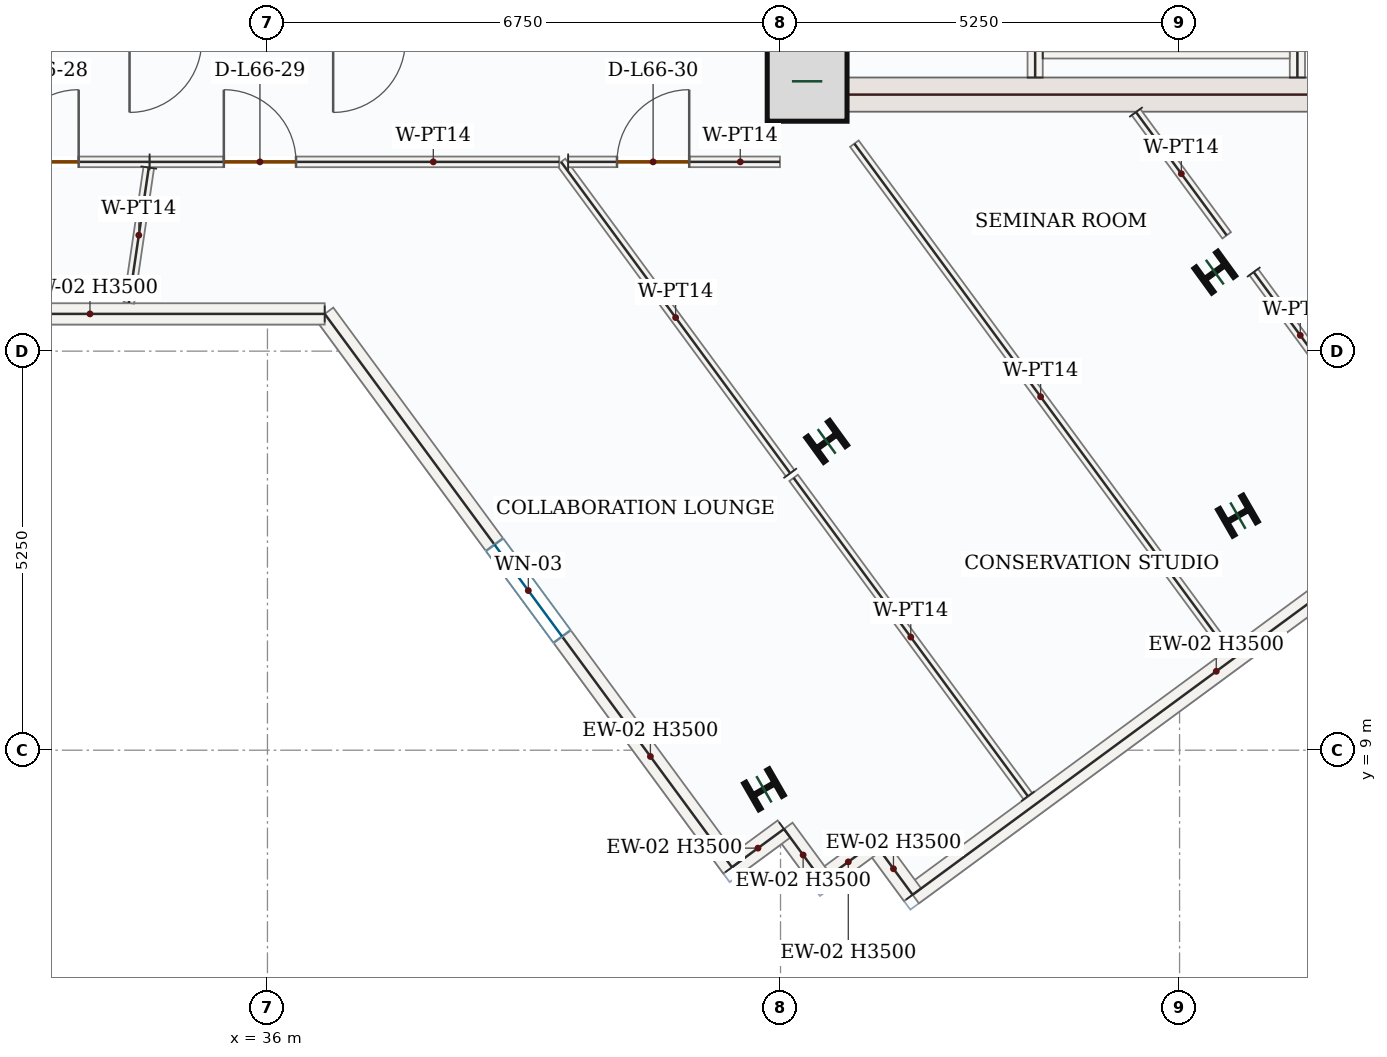
"""IFC4 building model, lengths in metres.
Left out: names, types, materials, properties, quantities, classifications, styles, units other than length and angle.
Written with IfcOpenShell. Run it as: python <this file> out.ifc"""

import sys

from ifc_helpers import new_model, si_unit, direction, frame, frame_2d, origin, origin_2d, place, context, subcontext, project, spatial, rectangle, i_section, extrude, source, transform, mapped, element, fill, save


model = new_model("IFC4")
c1 = context("Model", 3, precision=1e-05, world=origin(), true_north=direction((0.0, 1.0)))
c2 = subcontext(c1, "Body", "Model", "MODEL_VIEW")
j1 = project(units=[si_unit("LENGTHUNIT", "METRE"), si_unit("PLANEANGLEUNIT", "RADIAN")], contexts=[c1])
p1 = place(None, origin())
s1 = spatial("IfcSite", under=j1, at=p1, CompositionType="ELEMENT")
p2 = place(p1, origin())
s2 = spatial("IfcBuilding", under=s1, at=p2, CompositionType="ELEMENT")
p3 = place(p2, frame((0.0, 0.0, 276.6)))
s3 = spatial("IfcBuildingStorey", under=s2, at=p3, CompositionType="ELEMENT", Elevation=276.6)
p4 = place(p3, frame((42.975, 17.4, 0.0), z_axis=(0.0, 0.0, 1.0), x_axis=(0.0, 1.0, 0.0)))
e1 = element("IfcWall", 1, at=p4, inside=s3, PredefinedType="SHEAR", context=c2, shape_type="SweptSolid", body=[
    extrude(rectangle(XDim=8.55, YDim=0.45, at=frame_2d((4.275, 0.0))), origin(), (0.0, 0.0, 1.0), 3.5),
])
p5 = place(p4, frame((6.65, 0.0, 0.0)))
e2 = element("IfcOpeningElement", 2, at=p5, cuts=e1, PredefinedType="OPENING", context=c2, shape_type="SweptSolid", body=[
    extrude(rectangle(XDim=1.1, YDim=2.2, at=frame_2d((0.55, 1.1))), frame((0.0, 0.235, 0.0), z_axis=(0.0, -1.0, 0.0), x_axis=(1.0, 0.0, 0.0)), (0.0, 0.0, 1.0), 0.47),
])
p6 = place(p4, frame((1.75, 0.0, 0.0)))
e3 = element("IfcOpeningElement", 3, at=p6, cuts=e1, PredefinedType="OPENING", context=c2, shape_type="SweptSolid", body=[
    extrude(rectangle(XDim=1.3, YDim=2.2, at=frame_2d((0.65, 1.1))), frame((0.0, 0.235, 0.0), z_axis=(0.0, -1.0, 0.0), x_axis=(1.0, 0.0, 0.0)), (0.0, 0.0, 1.0), 0.47),
])
p7 = place(p4, frame((4.3, 0.0, 0.0)))
e4 = element("IfcOpeningElement", 4, at=p7, cuts=e1, PredefinedType="OPENING", context=c2, shape_type="SweptSolid", body=[
    extrude(rectangle(XDim=0.88, YDim=2.1, at=frame_2d((0.44, 1.05))), frame((0.0, 0.235, 0.0), z_axis=(0.0, -1.0, 0.0), x_axis=(1.0, 0.0, 0.0)), (0.0, 0.0, 1.0), 0.47),
])
m1 = source(origin(), c2, "Body", "SweptSolid", [
    extrude(rectangle(XDim=7.1, YDim=0.45, at=frame_2d((3.55, 0.0))), origin(), (0.0, 0.0, 1.0), 3.5),
])
p8 = place(p3, frame((43.2, 17.625, 0.0), z_axis=(0.0, 0.0, 1.0), x_axis=(1.0, 0.0, 0.0)))
e5 = element("IfcWall", 5, at=p8, inside=s3, PredefinedType="SHEAR", context=c2, shape_type="MappedRepresentation", body=[
    mapped(m1, transform((0.0, 0.0, 0.0), x_axis=(1.0, 0.0, 0.0), y_axis=(0.0, 1.0, 0.0), z_axis=(0.0, 0.0, 1.0), scale=1.0)),
])
m2 = source(origin(), c2, "Body", "SweptSolid", [
    extrude(rectangle(XDim=1.05, YDim=1.05, at=origin_2d()), origin(), (0.0, 0.0, 1.0), 3.75),
])
p9 = place(p3, frame((43.1, 17.8, 0.0), z_axis=(0.0, 0.0, 1.0), x_axis=(1.0, 0.0, 0.0)))
e6 = element("IfcColumn", 6, at=p9, inside=s3, PredefinedType="COLUMN", context=c2, shape_type="MappedRepresentation", body=[
    mapped(m2, transform((0.0, 0.0, 0.0), x_axis=(1.0, 0.0, 0.0), y_axis=(0.0, 1.0, 0.0), z_axis=(0.0, 0.0, 1.0), scale=1.0)),
])
m3 = source(origin(), c2, "Body", "SweptSolid", [
    extrude(i_section(OverallWidth=0.399, OverallDepth=0.386, WebThickness=0.021, FlangeThickness=0.033, FilletRadius=0.018, at=origin_2d()), origin(), (0.0, 0.0, 1.0), 3.75),
])
for number, where, z_axis, x_axis in (
    (7, (43.357, 13.063, 0.0), (0.0, 0.0, 1.0), (-0.588, 0.809, 0.0)),
    (8, (48.464, 15.289, 0.0), (0.0, 0.0, 1.0), (-0.588, 0.809, 0.0)),
    (9, (42.532, 8.486, 0.0), (0.0, 0.0, 1.0), (-0.5, 0.866, 0.0)),
    (10, (48.768, 12.086, 0.0), (0.0, 0.0, 1.0), (-0.5, 0.866, 0.0)),
):
    element("IfcColumn", number, at=place(p3, frame(where, z_axis=z_axis, x_axis=x_axis)), inside=s3, PredefinedType="COLUMN", context=c2, shape_type="MappedRepresentation", body=[
        mapped(m3, transform((0.0, 0.0, 0.0), x_axis=(1.0, 0.0, 0.0), y_axis=(0.0, 1.0, 0.0), z_axis=(0.0, 0.0, 1.0), scale=1.0)),
    ])
m4 = source(origin(), c2, "Body", "SweptSolid", [
    extrude(rectangle(XDim=9.92, YDim=0.28, at=frame_2d((4.96, 0.0))), origin(), (0.0, 0.0, 1.0), 3.5),
])
p10 = place(p3, frame((52.478, 12.978, 0.0), z_axis=(0.0, 0.0, 1.0), x_axis=(-0.805418797839, -0.592706132994, 0.0)))
e11 = element("IfcWall", 11, at=p10, inside=s3, PredefinedType="SOLIDWALL", context=c2, shape_type="MappedRepresentation", body=[
    mapped(m4, transform((0.0, 0.0, 0.0), x_axis=(1.0, 0.0, 0.0), y_axis=(0.0, 1.0, 0.0), z_axis=(0.0, 0.0, 1.0), scale=1.0)),
])
m5 = source(origin(), c2, "Body", "SweptSolid", [
    extrude(rectangle(XDim=0.85, YDim=0.28, at=frame_2d((0.425, 0.0))), origin(), (0.0, 0.0, 1.0), 3.5),
])
for number, where, z_axis, x_axis in (
    (12, (44.488, 7.098, 0.0), (0.0, 0.0, 1.0), (-0.593, 0.805, 0.0)),
    (13, (43.984, 7.783, 0.0), (0.0, 0.0, 1.0), (-0.805, -0.593, 0.0)),
):
    element("IfcWall", number, at=place(p3, frame(where, z_axis=z_axis, x_axis=x_axis)), inside=s3, PredefinedType="SOLIDWALL", context=c2, shape_type="MappedRepresentation", body=[
        mapped(m5, transform((0.0, 0.0, 0.0), x_axis=(1.0, 0.0, 0.0), y_axis=(0.0, 1.0, 0.0), z_axis=(0.0, 0.0, 1.0), scale=1.0)),
    ])
m6 = source(origin(), c2, "Body", "SweptSolid", [
    extrude(rectangle(XDim=0.85, YDim=0.28, at=frame_2d((0.425, 0.0))), origin(), (0.0, 0.0, 1.0), 3.5),
])
for number, where, z_axis, x_axis in (
    (14, (43.299, 7.279, 0.0), (0.0, 0.0, 1.0), (-0.593, 0.805, 0.0)),
    (15, (42.796, 7.963, 0.0), (0.0, 0.0, 1.0), (-0.805, -0.593, 0.0)),
):
    element("IfcWall", number, at=place(p3, frame(where, z_axis=z_axis, x_axis=x_axis)), inside=s3, PredefinedType="SOLIDWALL", context=c2, shape_type="MappedRepresentation", body=[
        mapped(m6, transform((0.0, 0.0, 0.0), x_axis=(1.0, 0.0, 0.0), y_axis=(0.0, 1.0, 0.0), z_axis=(0.0, 0.0, 1.0), scale=1.0)),
    ])
p11 = place(p3, frame((42.111, 7.46, 0.0), z_axis=(0.0, 0.0, 1.0), x_axis=(-0.592715239748, 0.805412096117, 0.0)))
e16 = element("IfcWall", 16, at=p11, inside=s3, PredefinedType="SOLIDWALL", context=c2, shape_type="SweptSolid", body=[
    extrude(rectangle(XDim=9.039, YDim=0.28, at=frame_2d((4.52, 0.0))), origin(), (0.0, 0.0, 1.0), 3.5),
])
p12 = place(p11, frame((3.77, 0.0, 0.85)))
e17 = element("IfcOpeningElement", 17, at=p12, cuts=e16, PredefinedType="OPENING", context=c2, shape_type="SweptSolid", body=[
    extrude(rectangle(XDim=1.5, YDim=1.5, at=frame_2d((0.75, 0.75))), frame((0.0, 0.15, 0.0), z_axis=(0.0, -1.0, 0.0), x_axis=(1.0, 0.0, 0.0)), (0.0, 0.0, 1.0), 0.3),
])
m7 = source(origin(), c2, "Body", "SweptSolid", [
    extrude(rectangle(XDim=6.177, YDim=0.28, at=frame_2d((3.088, 0.0))), origin(), (0.0, 0.0, 1.0), 3.5),
])
p13 = place(p3, frame((36.753, 14.74, 0.0), z_axis=(0.0, 0.0, 1.0), x_axis=(-1.0, 0.0, 0.0)))
e18 = element("IfcWall", 18, at=p13, inside=s3, PredefinedType="SOLIDWALL", context=c2, shape_type="MappedRepresentation", body=[
    mapped(m7, transform((0.0, 0.0, 0.0), x_axis=(1.0, 0.0, 0.0), y_axis=(0.0, 1.0, 0.0), z_axis=(0.0, 0.0, 1.0), scale=1.0)),
])
m8 = source(origin(), c2, "Body", "SweptSolid", [
    extrude(rectangle(XDim=7.87, YDim=0.2, at=frame_2d((3.935, 0.0))), origin(), (0.0, 0.0, 1.0), 3.5),
])
p14 = place(p3, frame((49.55, 17.85, 0.0), z_axis=(0.0, 0.0, 1.0), x_axis=(0.0, 1.0, 0.0)))
e19 = element("IfcWall", 19, at=p14, inside=s3, PredefinedType="SOLIDWALL", context=c2, shape_type="MappedRepresentation", body=[
    mapped(m8, transform((0.0, 0.0, 0.0), x_axis=(1.0, 0.0, 0.0), y_axis=(0.0, 1.0, 0.0), z_axis=(0.0, 0.0, 1.0), scale=1.0)),
])
p15 = place(p3, frame((46.1, 17.85, 0.0), z_axis=(0.0, 0.0, 1.0), x_axis=(0.0, 1.0, 0.0)))
e20 = element("IfcWall", 20, at=p15, inside=s3, PredefinedType="SOLIDWALL", context=c2, shape_type="SweptSolid", body=[
    extrude(rectangle(XDim=8.0, YDim=0.2, at=frame_2d((4.0, 0.0))), origin(), (0.0, 0.0, 1.0), 3.5),
])
p16 = place(p15, frame((6.3, 0.0, 0.0)))
e21 = element("IfcOpeningElement", 21, at=p16, cuts=e20, PredefinedType="OPENING", context=c2, shape_type="SweptSolid", body=[
    extrude(rectangle(XDim=1.05, YDim=2.15, at=frame_2d((0.525, 1.075))), frame((0.0, 0.11, 0.0), z_axis=(0.0, -1.0, 0.0), x_axis=(1.0, 0.0, 0.0)), (0.0, 0.0, 1.0), 0.22),
])
m9 = source(origin(), c2, "Body", "SweptSolid", [
    extrude(rectangle(XDim=3.25, YDim=0.2, at=frame_2d((1.625, 0.0))), origin(), (0.0, 0.0, 1.0), 3.5),
])
p17 = place(p3, frame((46.2, 18.2, 0.0), z_axis=(0.0, 0.0, 1.0), x_axis=(1.0, 0.0, 0.0)))
e22 = element("IfcWall", 22, at=p17, inside=s3, PredefinedType="SOLIDWALL", context=c2, shape_type="MappedRepresentation", body=[
    mapped(m9, transform((0.0, 0.0, 0.0), x_axis=(1.0, 0.0, 0.0), y_axis=(0.0, 1.0, 0.0), z_axis=(0.0, 0.0, 1.0), scale=1.0)),
])
m10 = source(origin(), c2, "Body", "SweptSolid", [
    extrude(rectangle(XDim=8.268, YDim=0.14, at=frame_2d((4.134, 0.0))), origin(), (0.0, 0.0, 1.0), 3.5),
])
p18 = place(p3, frame((48.622, 10.321, 0.0), z_axis=(0.0, 0.0, 1.0), x_axis=(-0.592718477136, 0.805409713663, 0.0)))
e23 = element("IfcWall", 23, at=p18, inside=s3, PredefinedType="PARTITIONING", context=c2, shape_type="MappedRepresentation", body=[
    mapped(m10, transform((0.0, 0.0, 0.0), x_axis=(1.0, 0.0, 0.0), y_axis=(0.0, 1.0, 0.0), z_axis=(0.0, 0.0, 1.0), scale=1.0)),
])
m11 = source(origin(), c2, "Body", "SweptSolid", [
    extrude(rectangle(XDim=2.013, YDim=0.14, at=frame_2d((1.006, 0.0))), origin(), (0.0, 0.0, 1.0), 3.5),
])
p19 = place(p3, frame((47.427, 17.395, 0.0), z_axis=(0.0, 0.0, 1.0), x_axis=(0.592698341467, -0.80542453155, 0.0)))
e24 = element("IfcWall", 24, at=p19, inside=s3, PredefinedType="PARTITIONING", context=c2, shape_type="MappedRepresentation", body=[
    mapped(m11, transform((0.0, 0.0, 0.0), x_axis=(1.0, 0.0, 0.0), y_axis=(0.0, 1.0, 0.0), z_axis=(0.0, 0.0, 1.0), scale=1.0)),
])
p20 = place(p3, frame((48.975, 15.29, 0.0), z_axis=(0.0, 0.0, 1.0), x_axis=(0.592735674873, -0.805397057192, 0.0)))
e25 = element("IfcWall", 25, at=p20, inside=s3, PredefinedType="PARTITIONING", context=c2, shape_type="SweptSolid", body=[
    extrude(rectangle(XDim=3.793, YDim=0.14, at=frame_2d((1.896, 0.0))), origin(), (0.0, 0.0, 1.0), 3.5),
])
p21 = place(p20, frame((2.218, 0.0, 0.0)))
e26 = element("IfcOpeningElement", 26, at=p21, cuts=e25, PredefinedType="OPENING", context=c2, shape_type="SweptSolid", body=[
    extrude(rectangle(XDim=0.95, YDim=2.15, at=frame_2d((0.475, 1.075))), frame((0.0, 0.08, 0.0), z_axis=(0.0, -1.0, 0.0), x_axis=(1.0, 0.0, 0.0)), (0.0, 0.0, 1.0), 0.16),
])
m12 = source(origin(), c2, "Body", "SweptSolid", [
    extrude(rectangle(XDim=5.2, YDim=0.14, at=frame_2d((2.6, 0.0))), origin(), (0.0, 0.0, 1.0), 3.5),
])
p22 = place(p3, frame((46.005, 8.394, 0.0), z_axis=(0.0, 0.0, 1.0), x_axis=(-0.592704087561, 0.805420303065, 0.0)))
e27 = element("IfcWall", 27, at=p22, inside=s3, PredefinedType="PARTITIONING", context=c2, shape_type="MappedRepresentation", body=[
    mapped(m12, transform((0.0, 0.0, 0.0), x_axis=(1.0, 0.0, 0.0), y_axis=(0.0, 1.0, 0.0), z_axis=(0.0, 0.0, 1.0), scale=1.0)),
])
m13 = source(origin(), c2, "Body", "SweptSolid", [
    extrude(rectangle(XDim=5.086, YDim=0.14, at=frame_2d((2.543, 0.0))), origin(), (0.0, 0.0, 1.0), 3.5),
])
p23 = place(p3, frame((42.877, 12.644, 0.0), z_axis=(0.0, 0.0, 1.0), x_axis=(-0.592678177251, 0.805439369668, 0.0)))
e28 = element("IfcWall", 28, at=p23, inside=s3, PredefinedType="PARTITIONING", context=c2, shape_type="MappedRepresentation", body=[
    mapped(m13, transform((0.0, 0.0, 0.0), x_axis=(1.0, 0.0, 0.0), y_axis=(0.0, 1.0, 0.0), z_axis=(0.0, 0.0, 1.0), scale=1.0)),
])
p24 = place(p3, frame((39.956, 16.74, 0.0), z_axis=(0.0, 0.0, 1.0), x_axis=(0.999999996161, 8.7619381e-05, 0.0)))
e29 = element("IfcWall", 29, at=p24, inside=s3, PredefinedType="PARTITIONING", context=c2, shape_type="SweptSolid", body=[
    extrude(rectangle(XDim=2.786, YDim=0.14, at=frame_2d((1.393, 0.0))), origin(), (0.0, 0.0, 1.0), 3.5),
])
p25 = place(p24, frame((0.643, 0.0, 0.0)))
e30 = element("IfcOpeningElement", 30, at=p25, cuts=e29, PredefinedType="OPENING", context=c2, shape_type="SweptSolid", body=[
    extrude(rectangle(XDim=0.95, YDim=2.15, at=frame_2d((0.475, 1.075))), frame((0.0, 0.08, 0.0), z_axis=(0.0, -1.0, 0.0), x_axis=(1.0, 0.0, 0.0)), (0.0, 0.0, 1.0), 0.16),
])
p26 = place(p3, frame((29.258, 16.74, 0.0), z_axis=(0.0, 0.0, 1.0), x_axis=(0.999999998895, -4.7021207e-05, 0.0)))
e31 = element("IfcWall", 31, at=p26, inside=s3, PredefinedType="PARTITIONING", context=c2, shape_type="SweptSolid", body=[
    extrude(rectangle(XDim=5.192, YDim=0.14, at=frame_2d((2.596, 0.0))), origin(), (0.0, 0.0, 1.0), 3.5),
])
p27 = place(p26, frame((3.309, 0.0, 0.0)))
e32 = element("IfcOpeningElement", 32, at=p27, cuts=e31, PredefinedType="OPENING", context=c2, shape_type="SweptSolid", body=[
    extrude(rectangle(XDim=0.95, YDim=2.15, at=frame_2d((0.475, 1.075))), frame((0.0, 0.08, 0.0), z_axis=(0.0, -1.0, 0.0), x_axis=(1.0, 0.0, 0.0)), (0.0, 0.0, 1.0), 0.16),
])
m14 = source(origin(), c2, "Body", "SweptSolid", [
    extrude(rectangle(XDim=1.799, YDim=0.14, at=frame_2d((0.9, 0.0))), origin(), (0.0, 0.0, 1.0), 3.5),
])
p28 = place(p3, frame((34.439, 16.665, 0.0), z_axis=(0.0, 0.0, 1.0), x_axis=(-0.14573227875, -0.989324063657, 0.0)))
e33 = element("IfcWall", 33, at=p28, inside=s3, PredefinedType="PARTITIONING", context=c2, shape_type="MappedRepresentation", body=[
    mapped(m14, transform((0.0, 0.0, 0.0), x_axis=(1.0, 0.0, 0.0), y_axis=(0.0, 1.0, 0.0), z_axis=(0.0, 0.0, 1.0), scale=1.0)),
])
p29 = place(p3, frame((34.45, 16.74, 0.0), z_axis=(0.0, 0.0, 1.0), x_axis=(1.0, 0.0, 0.0)))
e34 = element("IfcWall", 34, at=p29, inside=s3, PredefinedType="PARTITIONING", context=c2, shape_type="SweptSolid", body=[
    extrude(rectangle(XDim=5.388, YDim=0.14, at=frame_2d((2.694, 0.0))), origin(), (0.0, 0.0, 1.0), 3.5),
])
p30 = place(p29, frame((0.976, 0.0, 0.0)))
e35 = element("IfcOpeningElement", 35, at=p30, cuts=e34, PredefinedType="OPENING", context=c2, shape_type="SweptSolid", body=[
    extrude(rectangle(XDim=0.95, YDim=2.15, at=frame_2d((0.475, 1.075))), frame((0.0, 0.08, 0.0), z_axis=(0.0, -1.0, 0.0), x_axis=(1.0, 0.0, 0.0)), (0.0, 0.0, 1.0), 0.16),
])
m15 = source(origin(), c2, "Body", "SweptSolid", [
    extrude(rectangle(XDim=1.5, YDim=1.5, at=frame_2d((0.75, 0.75))), frame((0.0, 0.03, 0.0), z_axis=(0.0, -1.0, 0.0), x_axis=(1.0, 0.0, 0.0)), (0.0, 0.0, 1.0), 0.06),
])
p31 = place(p12, origin())
e36 = element("IfcWindow", 36, at=p31, inside=s3, PartitioningType="SINGLE_PANEL", PredefinedType="WINDOW", context=c2, shape_type="MappedRepresentation", body=[
    mapped(m15, transform((0.0, 0.0, 0.0), x_axis=(1.0, 0.0, 0.0), y_axis=(0.0, 1.0, 0.0), z_axis=(0.0, 0.0, 1.0), scale=1.0)),
])
fill(e17, e36)
m16 = source(origin(), c2, "Body", "SweptSolid", [
    extrude(rectangle(XDim=0.95, YDim=2.15, at=frame_2d((0.475, 1.075))), frame((0.0, 0.025, 0.0), z_axis=(0.0, -1.0, 0.0), x_axis=(1.0, 0.0, 0.0)), (0.0, 0.0, 1.0), 0.05),
])
p32 = place(p27, origin())
e37 = element("IfcDoor", 37, at=p32, inside=s3, OperationType="SINGLE_SWING_RIGHT", PredefinedType="DOOR", context=c2, shape_type="MappedRepresentation", body=[
    mapped(m16, transform((0.0, 0.0, 0.0), x_axis=(1.0, 0.0, 0.0), y_axis=(0.0, 1.0, 0.0), z_axis=(0.0, 0.0, 1.0), scale=1.0)),
])
fill(e32, e37)
p33 = place(p30, origin())
e38 = element("IfcDoor", 38, at=p33, inside=s3, OperationType="SINGLE_SWING_LEFT", PredefinedType="DOOR", context=c2, shape_type="MappedRepresentation", body=[
    mapped(m16, transform((0.0, 0.0, 0.0), x_axis=(1.0, 0.0, 0.0), y_axis=(0.0, 1.0, 0.0), z_axis=(0.0, 0.0, 1.0), scale=1.0)),
])
fill(e35, e38)
p34 = place(p25, origin())
e39 = element("IfcDoor", 39, at=p34, inside=s3, OperationType="SINGLE_SWING_RIGHT", PredefinedType="DOOR", context=c2, shape_type="MappedRepresentation", body=[
    mapped(m16, transform((0.0, 0.0, 0.0), x_axis=(1.0, 0.0, 0.0), y_axis=(0.0, 1.0, 0.0), z_axis=(0.0, 0.0, 1.0), scale=1.0)),
])
fill(e30, e39)
save(model, sys.argv[1])
